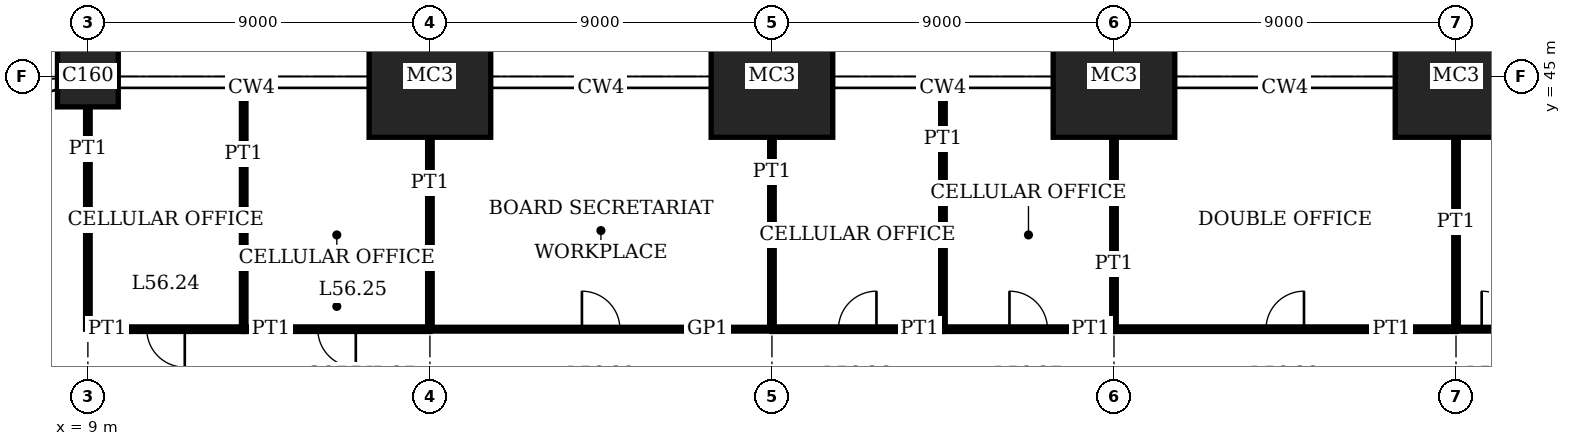
"""IFC4 building model, lengths in metres.
Left out: names, types, materials, properties, quantities, classifications, styles, units other than length and angle.
Written with IfcOpenShell. Run it as: python <this file> out.ifc"""

import sys

from ifc_helpers import new_model, si_unit, direction, frame, frame_2d, origin, origin_2d, place, context, subcontext, project, spatial, rectangle, extrude, element, fill, save


model = new_model("IFC4")
c1 = context("Model", 3, precision=1e-05, world=origin(), true_north=direction((0.0, 1.0)))
c2 = subcontext(c1, "Body", "Model", "MODEL_VIEW")
j1 = project(units=[si_unit("LENGTHUNIT", "METRE"), si_unit("PLANEANGLEUNIT", "RADIAN")], contexts=[c1])
p1 = place(None, origin())
s1 = spatial("IfcSite", under=j1, at=p1, CompositionType="ELEMENT")
p2 = place(p1, origin())
s2 = spatial("IfcBuilding", under=s1, at=p2, CompositionType="ELEMENT")
p3 = place(p2, frame((0.0, 0.0, 230.2)))
s3 = spatial("IfcBuildingStorey", under=s2, at=p3, CompositionType="ELEMENT", Elevation=230.2)
p4 = place(p3, frame((9.0, 45.0, 0.0), z_axis=(0.0, 0.0, 1.0), x_axis=(1.0, 0.0, 0.0)))
e1 = element("IfcColumn", 1, at=p4, inside=s3, PredefinedType="COLUMN", context=c2, shape_type="SweptSolid", body=[
    extrude(rectangle(XDim=1.6, YDim=1.6, at=origin_2d()), origin(), (0.0, 0.0, 1.0), 4.2),
])
for number, where, z_axis, x_axis in (
    (2, (18.0, 45.0, 0.0), (0.0, 0.0, 1.0), (1.0, 0.0, 0.0)),
    (3, (27.0, 45.0, 0.0), (0.0, 0.0, 1.0), (1.0, 0.0, 0.0)),
    (4, (36.0, 45.0, 0.0), (0.0, 0.0, 1.0), (1.0, 0.0, 0.0)),
    (5, (45.0, 45.0, 0.0), (0.0, 0.0, 1.0), (1.0, 0.0, 0.0)),
):
    element("IfcColumn", number, at=place(p3, frame(where, z_axis=z_axis, x_axis=x_axis)), inside=s3, PredefinedType="COLUMN", context=c2, shape_type="SweptSolid", body=[
        extrude(rectangle(XDim=3.2, YDim=3.2, at=origin_2d()), origin(), (0.0, 0.0, 1.0), 4.2),
    ])
p5 = place(p3, frame((9.0, 38.35, 0.0), z_axis=(0.0, 0.0, 1.0), x_axis=(1.0, 0.0, 0.0)))
e6 = element("IfcWall", 6, at=p5, inside=s3, PredefinedType="PARTITIONING", context=c2, shape_type="SweptSolid", body=[
    extrude(rectangle(XDim=4.1, YDim=0.12, at=frame_2d((2.05, 0.0))), origin(), (0.0, 0.0, 1.0), 3.85),
])
p6 = place(p5, frame((1.55, 0.0, 0.0)))
e7 = element("IfcOpeningElement", 7, at=p6, cuts=e6, PredefinedType="OPENING", context=c2, shape_type="SweptSolid", body=[
    extrude(rectangle(XDim=1.0, YDim=2.4, at=frame_2d((0.5, 1.2))), frame((0.0, 0.07, 0.0), z_axis=(0.0, -1.0, 0.0), x_axis=(1.0, 0.0, 0.0)), (0.0, 0.0, 1.0), 0.14),
])
p7 = place(p3, frame((13.1, 38.35, 0.0), z_axis=(0.0, 0.0, 1.0), x_axis=(1.0, 0.0, 0.0)))
e8 = element("IfcWall", 8, at=p7, inside=s3, PredefinedType="PARTITIONING", context=c2, shape_type="SweptSolid", body=[
    extrude(rectangle(XDim=4.9, YDim=0.12, at=frame_2d((2.45, 0.0))), origin(), (0.0, 0.0, 1.0), 3.85),
])
p8 = place(p7, frame((1.95, 0.0, 0.0)))
e9 = element("IfcOpeningElement", 9, at=p8, cuts=e8, PredefinedType="OPENING", context=c2, shape_type="SweptSolid", body=[
    extrude(rectangle(XDim=1.0, YDim=2.4, at=frame_2d((0.5, 1.2))), frame((0.0, 0.07, 0.0), z_axis=(0.0, -1.0, 0.0), x_axis=(1.0, 0.0, 0.0)), (0.0, 0.0, 1.0), 0.14),
])
p9 = place(p3, frame((27.0, 38.35, 0.0), z_axis=(0.0, 0.0, 1.0), x_axis=(1.0, 0.0, 0.0)))
e10 = element("IfcWall", 10, at=p9, inside=s3, PredefinedType="PARTITIONING", context=c2, shape_type="SweptSolid", body=[
    extrude(rectangle(XDim=4.5, YDim=0.12, at=frame_2d((2.25, 0.0))), origin(), (0.0, 0.0, 1.0), 3.85),
])
p10 = place(p9, frame((1.75, 0.0, 0.0)))
e11 = element("IfcOpeningElement", 11, at=p10, cuts=e10, PredefinedType="OPENING", context=c2, shape_type="SweptSolid", body=[
    extrude(rectangle(XDim=1.0, YDim=2.4, at=frame_2d((0.5, 1.2))), frame((0.0, 0.07, 0.0), z_axis=(0.0, -1.0, 0.0), x_axis=(1.0, 0.0, 0.0)), (0.0, 0.0, 1.0), 0.14),
])
p11 = place(p3, frame((31.5, 38.35, 0.0), z_axis=(0.0, 0.0, 1.0), x_axis=(1.0, 0.0, 0.0)))
e12 = element("IfcWall", 12, at=p11, inside=s3, PredefinedType="PARTITIONING", context=c2, shape_type="SweptSolid", body=[
    extrude(rectangle(XDim=4.5, YDim=0.12, at=frame_2d((2.25, 0.0))), origin(), (0.0, 0.0, 1.0), 3.85),
])
p12 = place(p11, frame((1.75, 0.0, 0.0)))
e13 = element("IfcOpeningElement", 13, at=p12, cuts=e12, PredefinedType="OPENING", context=c2, shape_type="SweptSolid", body=[
    extrude(rectangle(XDim=1.0, YDim=2.4, at=frame_2d((0.5, 1.2))), frame((0.0, 0.07, 0.0), z_axis=(0.0, -1.0, 0.0), x_axis=(1.0, 0.0, 0.0)), (0.0, 0.0, 1.0), 0.14),
])
p13 = place(p3, frame((36.0, 38.35, 0.0), z_axis=(0.0, 0.0, 1.0), x_axis=(1.0, 0.0, 0.0)))
e14 = element("IfcWall", 14, at=p13, inside=s3, PredefinedType="PARTITIONING", context=c2, shape_type="SweptSolid", body=[
    extrude(rectangle(XDim=9.0, YDim=0.12, at=frame_2d((4.5, 0.0))), origin(), (0.0, 0.0, 1.0), 3.85),
])
p14 = place(p13, frame((4.0, 0.0, 0.0)))
e15 = element("IfcOpeningElement", 15, at=p14, cuts=e14, PredefinedType="OPENING", context=c2, shape_type="SweptSolid", body=[
    extrude(rectangle(XDim=1.0, YDim=2.4, at=frame_2d((0.5, 1.2))), frame((0.0, 0.07, 0.0), z_axis=(0.0, -1.0, 0.0), x_axis=(1.0, 0.0, 0.0)), (0.0, 0.0, 1.0), 0.14),
])
p15 = place(p3, frame((18.0, 38.35, 0.0), z_axis=(0.0, 0.0, 1.0), x_axis=(1.0, 0.0, 0.0)))
e16 = element("IfcWall", 16, at=p15, inside=s3, PredefinedType="PARTITIONING", context=c2, shape_type="SweptSolid", body=[
    extrude(rectangle(XDim=9.0, YDim=0.1, at=frame_2d((4.5, 0.0))), origin(), (0.0, 0.0, 1.0), 3.85),
])
p16 = place(p15, frame((4.0, 0.0, 0.0)))
e17 = element("IfcOpeningElement", 17, at=p16, cuts=e16, PredefinedType="OPENING", context=c2, shape_type="SweptSolid", body=[
    extrude(rectangle(XDim=1.0, YDim=2.4, at=frame_2d((0.5, 1.2))), frame((0.0, 0.06, 0.0), z_axis=(0.0, -1.0, 0.0), x_axis=(1.0, 0.0, 0.0)), (0.0, 0.0, 1.0), 0.12),
])
p17 = place(p3, frame((45.0, 38.35, 0.0), z_axis=(0.0, 0.0, 1.0), x_axis=(1.0, 0.0, 0.0)))
e18 = element("IfcWall", 18, at=p17, inside=s3, PredefinedType="PARTITIONING", context=c2, shape_type="SweptSolid", body=[
    extrude(rectangle(XDim=2.35, YDim=0.1, at=frame_2d((1.175, 0.0))), origin(), (0.0, 0.0, 1.0), 3.85),
])
p18 = place(p17, frame((0.675, 0.0, 0.0)))
e19 = element("IfcOpeningElement", 19, at=p18, cuts=e18, PredefinedType="OPENING", context=c2, shape_type="SweptSolid", body=[
    extrude(rectangle(XDim=1.0, YDim=2.4, at=frame_2d((0.5, 1.2))), frame((0.0, 0.06, 0.0), z_axis=(0.0, -1.0, 0.0), x_axis=(1.0, 0.0, 0.0)), (0.0, 0.0, 1.0), 0.12),
])
p19 = place(p3, frame((9.0, 38.35, 0.0), z_axis=(0.0, 0.0, 1.0), x_axis=(0.0, 1.0, 0.0)))
e20 = element("IfcWall", 20, at=p19, inside=s3, PredefinedType="PARTITIONING", context=c2, shape_type="SweptSolid", body=[
    extrude(rectangle(XDim=5.85, YDim=0.12, at=frame_2d((2.925, 0.0))), origin(), (0.0, 0.0, 1.0), 3.05),
])
p20 = place(p3, frame((13.1, 38.35, 0.0), z_axis=(0.0, 0.0, 1.0), x_axis=(0.0, 1.0, 0.0)))
e21 = element("IfcWall", 21, at=p20, inside=s3, PredefinedType="PARTITIONING", context=c2, shape_type="SweptSolid", body=[
    extrude(rectangle(XDim=6.34, YDim=0.12, at=frame_2d((3.17, 0.0))), origin(), (0.0, 0.0, 1.0), 3.85),
])
for number, where, z_axis, x_axis in (
    (22, (18.0, 38.35, 0.0), (0.0, 0.0, 1.0), (0.0, 1.0, 0.0)),
    (23, (27.0, 38.35, 0.0), (0.0, 0.0, 1.0), (0.0, 1.0, 0.0)),
):
    element("IfcWall", number, at=place(p3, frame(where, z_axis=z_axis, x_axis=x_axis)), inside=s3, PredefinedType="PARTITIONING", context=c2, shape_type="SweptSolid", body=[
        extrude(rectangle(XDim=5.05, YDim=0.12, at=frame_2d((2.525, 0.0))), origin(), (0.0, 0.0, 1.0), 3.25),
    ])
p21 = place(p3, frame((31.5, 38.35, 0.0), z_axis=(0.0, 0.0, 1.0), x_axis=(0.0, 1.0, 0.0)))
e24 = element("IfcWall", 24, at=p21, inside=s3, PredefinedType="PARTITIONING", context=c2, shape_type="SweptSolid", body=[
    extrude(rectangle(XDim=6.34, YDim=0.12, at=frame_2d((3.17, 0.0))), origin(), (0.0, 0.0, 1.0), 3.85),
])
for number, where, z_axis, x_axis in (
    (25, (36.0, 38.35, 0.0), (0.0, 0.0, 1.0), (0.0, 1.0, 0.0)),
    (26, (45.0, 38.35, 0.0), (0.0, 0.0, 1.0), (0.0, 1.0, 0.0)),
):
    element("IfcWall", number, at=place(p3, frame(where, z_axis=z_axis, x_axis=x_axis)), inside=s3, PredefinedType="PARTITIONING", context=c2, shape_type="SweptSolid", body=[
        extrude(rectangle(XDim=5.05, YDim=0.12, at=frame_2d((2.525, 0.0))), origin(), (0.0, 0.0, 1.0), 3.25),
    ])
p22 = place(p6, origin())
e27 = element("IfcDoor", 27, at=p22, inside=s3, OperationType="SINGLE_SWING_RIGHT", PredefinedType="DOOR", context=c2, shape_type="SweptSolid", body=[
    extrude(rectangle(XDim=1.0, YDim=2.4, at=frame_2d((0.5, 1.2))), frame((0.0, 0.025, 0.0), z_axis=(0.0, -1.0, 0.0), x_axis=(1.0, 0.0, 0.0)), (0.0, 0.0, 1.0), 0.05),
])
fill(e7, e27)
p23 = place(p8, origin())
e28 = element("IfcDoor", 28, at=p23, inside=s3, OperationType="SINGLE_SWING_RIGHT", PredefinedType="DOOR", context=c2, shape_type="SweptSolid", body=[
    extrude(rectangle(XDim=1.0, YDim=2.4, at=frame_2d((0.5, 1.2))), frame((0.0, 0.025, 0.0), z_axis=(0.0, -1.0, 0.0), x_axis=(1.0, 0.0, 0.0)), (0.0, 0.0, 1.0), 0.05),
])
fill(e9, e28)
p24 = place(p10, origin())
e29 = element("IfcDoor", 29, at=p24, inside=s3, OperationType="SINGLE_SWING_LEFT", PredefinedType="DOOR", context=c2, shape_type="SweptSolid", body=[
    extrude(rectangle(XDim=1.0, YDim=2.4, at=frame_2d((0.5, 1.2))), frame((0.0, 0.025, 0.0), z_axis=(0.0, -1.0, 0.0), x_axis=(1.0, 0.0, 0.0)), (0.0, 0.0, 1.0), 0.05),
])
fill(e11, e29)
p25 = place(p12, origin())
e30 = element("IfcDoor", 30, at=p25, inside=s3, OperationType="SINGLE_SWING_RIGHT", PredefinedType="DOOR", context=c2, shape_type="SweptSolid", body=[
    extrude(rectangle(XDim=1.0, YDim=2.4, at=frame_2d((0.5, 1.2))), frame((0.0, 0.025, 0.0), z_axis=(0.0, -1.0, 0.0), x_axis=(1.0, 0.0, 0.0)), (0.0, 0.0, 1.0), 0.05),
])
fill(e13, e30)
p26 = place(p14, origin())
e31 = element("IfcDoor", 31, at=p26, inside=s3, OperationType="SINGLE_SWING_LEFT", PredefinedType="DOOR", context=c2, shape_type="SweptSolid", body=[
    extrude(rectangle(XDim=1.0, YDim=2.4, at=frame_2d((0.5, 1.2))), frame((0.0, 0.025, 0.0), z_axis=(0.0, -1.0, 0.0), x_axis=(1.0, 0.0, 0.0)), (0.0, 0.0, 1.0), 0.05),
])
fill(e15, e31)
p27 = place(p16, origin())
e32 = element("IfcDoor", 32, at=p27, inside=s3, OperationType="SINGLE_SWING_RIGHT", PredefinedType="DOOR", context=c2, shape_type="SweptSolid", body=[
    extrude(rectangle(XDim=1.0, YDim=2.4, at=frame_2d((0.5, 1.2))), frame((0.0, 0.02, 0.0), z_axis=(0.0, -1.0, 0.0), x_axis=(1.0, 0.0, 0.0)), (0.0, 0.0, 1.0), 0.04),
])
fill(e17, e32)
p28 = place(p18, origin())
e33 = element("IfcDoor", 33, at=p28, inside=s3, OperationType="SINGLE_SWING_RIGHT", PredefinedType="DOOR", context=c2, shape_type="SweptSolid", body=[
    extrude(rectangle(XDim=1.0, YDim=2.4, at=frame_2d((0.5, 1.2))), frame((0.0, 0.02, 0.0), z_axis=(0.0, -1.0, 0.0), x_axis=(1.0, 0.0, 0.0)), (0.0, 0.0, 1.0), 0.04),
])
fill(e19, e33)
save(model, sys.argv[1])
